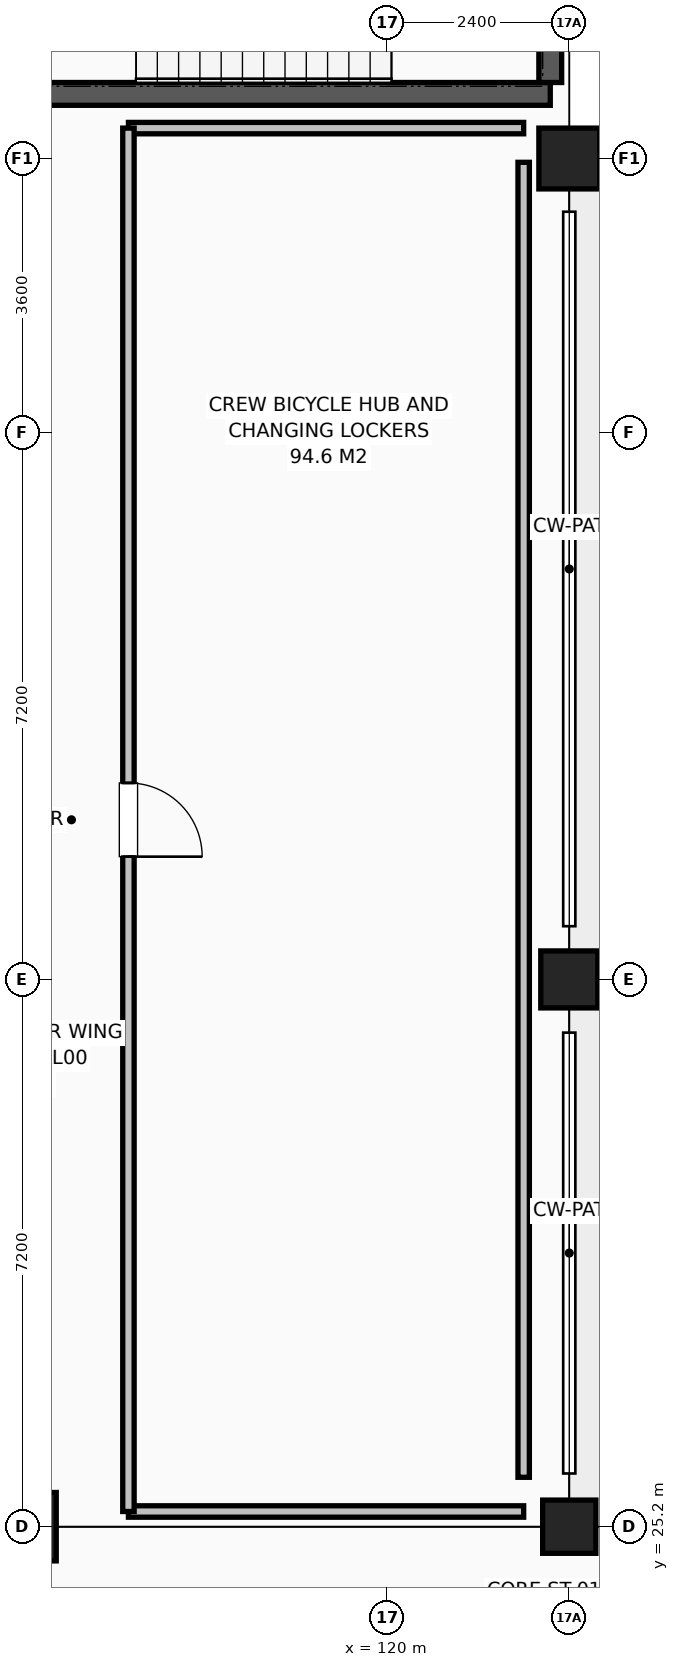
"""IFC4 building model, lengths in metres.
Left out: names, types, materials, properties, quantities, classifications, styles, units other than length and angle.
Written with IfcOpenShell. Run it as: python <this file> out.ifc"""

import sys

from ifc_helpers import new_model, si_unit, direction, frame, frame_2d, origin, origin_2d, place, context, subcontext, project, spatial, rectangle, circle, extrude, element, fill, save


model = new_model("IFC4")
c1 = context("Model", 3, precision=1e-05, world=origin(), true_north=direction((0.0, 1.0)))
c2 = subcontext(c1, "Body", "Model", "MODEL_VIEW")
j1 = project(units=[si_unit("LENGTHUNIT", "METRE"), si_unit("PLANEANGLEUNIT", "RADIAN")], contexts=[c1])
p1 = place(None, origin())
s1 = spatial("IfcSite", under=j1, at=p1, CompositionType="ELEMENT")
p2 = place(p1, origin())
s2 = spatial("IfcBuilding", under=s1, at=p2, CompositionType="ELEMENT")
p3 = place(p2, origin())
s3 = spatial("IfcBuildingStorey", under=s2, at=p3, CompositionType="ELEMENT", Elevation=0.0)
p4 = place(p3, frame((115.2, 25.2, 0.0), z_axis=(0.0, 0.0, 1.0), x_axis=(1.0, 0.0, 0.0)))
e1 = element("IfcColumn", 1, at=p4, inside=s3, PredefinedType="COLUMN", context=c2, shape_type="SweptSolid", body=[
    extrude(circle(Radius=0.45, at=origin_2d()), origin(), (0.0, 0.0, 1.0), 4.8),
])
p5 = place(p3, frame((122.4, 25.2, 0.0), z_axis=(0.0, 0.0, 1.0), x_axis=(1.0, 0.0, 0.0)))
e2 = element("IfcColumn", 2, at=p5, inside=s3, PredefinedType="COLUMN", context=c2, shape_type="SweptSolid", body=[
    extrude(rectangle(XDim=0.7, YDim=0.7, at=origin_2d()), origin(), (0.0, 0.0, 1.0), 4.8),
])
p6 = place(p3, frame((122.4, 32.4, 0.0), z_axis=(0.0, 0.0, 1.0), x_axis=(1.0, 0.0, 0.0)))
e3 = element("IfcColumn", 3, at=p6, inside=s3, PredefinedType="COLUMN", context=c2, shape_type="SweptSolid", body=[
    extrude(rectangle(XDim=0.75, YDim=0.75, at=origin_2d()), origin(), (0.0, 0.0, 1.0), 4.8),
])
p7 = place(p3, frame((122.4, 43.2, 0.0), z_axis=(0.0, 0.0, 1.0), x_axis=(1.0, 0.0, 0.0)))
e4 = element("IfcColumn", 4, at=p7, inside=s3, PredefinedType="COLUMN", context=c2, shape_type="SweptSolid", body=[
    extrude(rectangle(XDim=0.8, YDim=0.8, at=origin_2d()), origin(), (0.0, 0.0, 1.0), 4.8),
])
p8 = place(p3, frame((115.05, 44.05, 0.0), z_axis=(0.0, 0.0, 1.0), x_axis=(1.0, 0.0, 0.0)))
e5 = element("IfcWall", 5, at=p8, inside=s3, PredefinedType="SHEAR", context=c2, shape_type="SweptSolid", body=[
    extrude(rectangle(XDim=7.1, YDim=0.3, at=frame_2d((3.55, 0.0))), origin(), (0.0, 0.0, 1.0), 4.525),
])
p9 = place(p3, frame((122.15, 44.2, 0.0), z_axis=(0.0, 0.0, 1.0), x_axis=(0.0, 1.0, 0.0)))
e6 = element("IfcWall", 6, at=p9, inside=s3, PredefinedType="SHEAR", context=c2, shape_type="SweptSolid", body=[
    extrude(rectangle(XDim=2.9, YDim=0.3, at=frame_2d((1.45, 0.0))), origin(), (0.0, 0.0, 1.0), 4.525),
])
for number, where, z_axis, x_axis in (
    (7, (116.6, 43.6, 0.0), (0.0, 0.0, 1.0), (1.0, 0.0, 0.0)),
    (8, (121.8, 25.4, 0.0), (0.0, 0.0, 1.0), (-1.0, 0.0, 0.0)),
):
    element("IfcWall", number, at=place(p3, frame(where, z_axis=z_axis, x_axis=x_axis)), inside=s3, PredefinedType="PARTITIONING", context=c2, shape_type="SweptSolid", body=[
        extrude(rectangle(XDim=5.2, YDim=0.15, at=frame_2d((2.6, 0.0))), origin(), (0.0, 0.0, 1.0), 4.0),
    ])
p10 = place(p3, frame((121.8, 25.85, 0.0), z_axis=(0.0, 0.0, 1.0), x_axis=(0.0, 1.0, 0.0)))
e9 = element("IfcWall", 9, at=p10, inside=s3, PredefinedType="PARTITIONING", context=c2, shape_type="SweptSolid", body=[
    extrude(rectangle(XDim=17.3, YDim=0.15, at=frame_2d((8.65, 0.0))), origin(), (0.0, 0.0, 1.0), 3.807),
])
p11 = place(p3, frame((116.6, 43.6, 0.0), z_axis=(0.0, 0.0, 1.0), x_axis=(0.0, -1.0, 0.0)))
e10 = element("IfcWall", 10, at=p11, inside=s3, PredefinedType="PARTITIONING", context=c2, shape_type="SweptSolid", body=[
    extrude(rectangle(XDim=18.2, YDim=0.15, at=frame_2d((9.1, 0.0))), origin(), (0.0, 0.0, 1.0), 3.807),
])
p12 = place(p11, frame((8.615, 0.0, 0.0)))
e11 = element("IfcOpeningElement", 11, at=p12, cuts=e10, PredefinedType="OPENING", context=c2, shape_type="SweptSolid", body=[
    extrude(rectangle(XDim=0.97, YDim=2.15, at=frame_2d((0.485, 1.075))), frame((0.0, 0.085, 0.0), z_axis=(0.0, -1.0, 0.0), x_axis=(1.0, 0.0, 0.0)), (0.0, 0.0, 1.0), 0.17),
])
p13 = place(p12, origin())
e12 = element("IfcDoor", 12, at=p13, inside=s3, OperationType="SINGLE_SWING_RIGHT", PredefinedType="DOOR", context=c2, shape_type="SweptSolid", body=[
    extrude(rectangle(XDim=0.97, YDim=2.15, at=frame_2d((0.485, 1.075))), frame((0.0, 0.025, 0.0), z_axis=(0.0, -1.0, 0.0), x_axis=(1.0, 0.0, 0.0)), (0.0, 0.0, 1.0), 0.05),
])
fill(e11, e12)
save(model, sys.argv[1])
